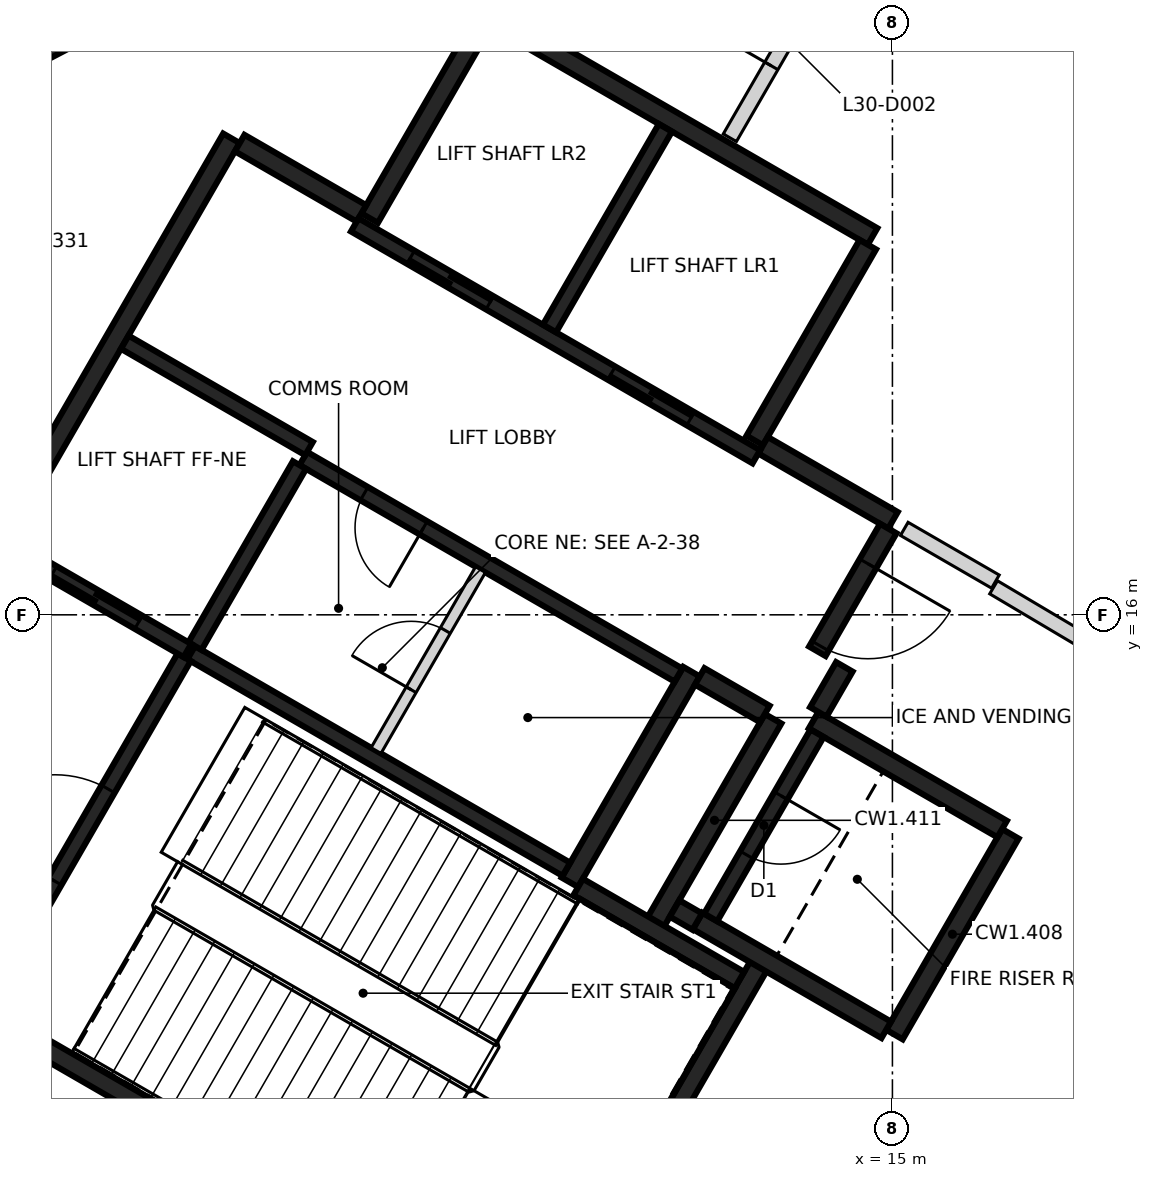
"""IFC4 building model, lengths in metres.
Left out: names, types, materials, properties, quantities, classifications, styles, units other than length and angle.
Written with IfcOpenShell. Run it as: python <this file> out.ifc"""

import sys

from ifc_helpers import new_model, si_unit, direction, frame, frame_2d, origin, origin_2d, place, context, subcontext, project, spatial, rectangle, extrude, element, fill, save


model = new_model("IFC4")
c1 = context("Model", 3, precision=1e-05, world=origin(), true_north=direction((0.0, 1.0)))
c2 = subcontext(c1, "Body", "Model", "MODEL_VIEW")
j1 = project(units=[si_unit("LENGTHUNIT", "METRE"), si_unit("PLANEANGLEUNIT", "RADIAN")], contexts=[c1])
p1 = place(None, origin())
s1 = spatial("IfcSite", under=j1, at=p1, CompositionType="ELEMENT")
p2 = place(p1, origin())
s2 = spatial("IfcBuilding", under=s1, at=p2, CompositionType="ELEMENT")
p3 = place(p2, frame((0.0, 0.0, 123.8)))
s3 = spatial("IfcBuildingStorey", under=s2, at=p3, CompositionType="ELEMENT", Elevation=123.8)
p4 = place(p3, frame((3.667, 23.896, -0.4), z_axis=(0.0, 0.0, 1.0), x_axis=(-0.463006774365, 0.886354740999, 0.0)))
e1 = element("IfcColumn", 1, at=p4, inside=s3, PredefinedType="COLUMN", context=c2, shape_type="SweptSolid", body=[
    extrude(rectangle(XDim=1.25, YDim=0.85, at=origin_2d()), origin(), (0.0, 0.0, 1.0), 5.0),
])
p5 = place(p3, frame((10.42, 6.498, 0.0), z_axis=(0.0, 0.0, 1.0), x_axis=(-0.866021906294, 0.500006057782, 0.0)))
e2 = element("IfcWall", 2, at=p5, inside=s3, PredefinedType="SHEAR", context=c2, shape_type="SweptSolid", body=[
    extrude(rectangle(XDim=11.55, YDim=0.25, at=frame_2d((5.775, 0.0))), origin(), (0.0, 0.0, 1.0), 4.6),
])
p6 = place(p5, frame((10.025, 0.0, 0.0)))
e3 = element("IfcOpeningElement", 3, at=p6, cuts=e2, PredefinedType="OPENING", context=c2, shape_type="SweptSolid", body=[
    extrude(rectangle(XDim=1.2, YDim=2.1, at=frame_2d((0.6, 1.05))), frame((0.0, 0.135, 0.0), z_axis=(0.0, -1.0, 0.0), x_axis=(1.0, 0.0, 0.0)), (0.0, 0.0, 1.0), 0.27),
])
p7 = place(p5, frame((8.725, 0.0, 0.0)))
e4 = element("IfcOpeningElement", 4, at=p7, cuts=e2, PredefinedType="OPENING", context=c2, shape_type="SweptSolid", body=[
    extrude(rectangle(XDim=1.2, YDim=2.1, at=frame_2d((0.6, 1.05))), frame((0.0, 0.135, 0.0), z_axis=(0.0, -1.0, 0.0), x_axis=(1.0, 0.0, 0.0)), (0.0, 0.0, 1.0), 0.27),
])
p8 = place(p3, frame((3.179, 16.856, 0.0), z_axis=(0.0, 0.0, 1.0), x_axis=(0.500004234368, 0.866022959057, 0.0)))
e5 = element("IfcWall", 5, at=p8, inside=s3, PredefinedType="SHEAR", context=c2, shape_type="SweptSolid", body=[
    extrude(rectangle(XDim=6.25, YDim=0.25, at=frame_2d((3.125, 0.0))), origin(), (0.0, 0.0, 1.0), 4.6),
])
p9 = place(p3, frame((9.673, 23.903, 0.0), z_axis=(0.0, 0.0, 1.0), x_axis=(0.86603616409, -0.499981362141, 0.0)))
e6 = element("IfcWall", 6, at=p9, inside=s3, PredefinedType="SHEAR", context=c2, shape_type="SweptSolid", body=[
    extrude(rectangle(XDim=5.85, YDim=0.25, at=frame_2d((2.925, 0.0))), origin(), (0.0, 0.0, 1.0), 4.6),
])
p10 = place(p3, frame((13.238, 11.378, 0.0), z_axis=(0.0, 0.0, 1.0), x_axis=(-0.500008851346, -0.866020293397, 0.0)))
e7 = element("IfcWall", 7, at=p10, inside=s3, PredefinedType="SHEAR", context=c2, shape_type="SweptSolid", body=[
    extrude(rectangle(XDim=5.51, YDim=0.25, at=frame_2d((2.755, 0.0))), origin(), (0.0, 0.0, 1.0), 4.6),
])
p11 = place(p3, frame((12.357, 15.252, 0.0), z_axis=(0.0, 0.0, 1.0), x_axis=(-0.500028443584, -0.866008981251, 0.0)))
e8 = element("IfcWall", 8, at=p11, inside=s3, PredefinedType="SHEAR", context=c2, shape_type="SweptSolid", body=[
    extrude(rectangle(XDim=3.2, YDim=0.25, at=frame_2d((1.6, 0.0))), origin(), (0.0, 0.0, 1.0), 4.6),
])
for number, where, z_axis, x_axis in (
    (9, (8.123, 21.219, 0.0), (0.0, 0.0, 1.0), (0.5, 0.866, 0.0)),
    (10, (14.676, 20.87, 0.0), (0.0, 0.0, 1.0), (-0.5, -0.866, 0.0)),
):
    element("IfcWall", number, at=place(p3, frame(where, z_axis=z_axis, x_axis=x_axis)), inside=s3, PredefinedType="SHEAR", context=c2, shape_type="SweptSolid", body=[
        extrude(rectangle(XDim=2.975, YDim=0.25, at=frame_2d((1.487, 0.0))), origin(), (0.0, 0.0, 1.0), 4.6),
    ])
p12 = place(p3, frame((16.552, 13.119, 0.0), z_axis=(0.0, 0.0, 1.0), x_axis=(-0.499978833458, -0.866037623948, 0.0)))
e11 = element("IfcWall", 11, at=p12, inside=s3, PredefinedType="SHEAR", context=c2, shape_type="SweptSolid", body=[
    extrude(rectangle(XDim=3.05, YDim=0.25, at=frame_2d((1.525, 0.0))), origin(), (0.0, 0.0, 1.0), 4.6),
])
p13 = place(p3, frame((14.918, 10.54, 0.0), z_axis=(0.0, 0.0, 1.0), x_axis=(-0.866063538972, 0.499933942099, 0.0)))
e12 = element("IfcWall", 12, at=p13, inside=s3, PredefinedType="SHEAR", context=c2, shape_type="SweptSolid", body=[
    extrude(rectangle(XDim=2.865, YDim=0.25, at=frame_2d((1.432, 0.0))), origin(), (0.0, 0.0, 1.0), 4.6),
])
p14 = place(p3, frame((13.963, 14.614, 0.0), z_axis=(0.0, 0.0, 1.0), x_axis=(0.866042235819, -0.499970844928, 0.0)))
e13 = element("IfcWall", 13, at=p14, inside=s3, PredefinedType="SHEAR", context=c2, shape_type="SweptSolid", body=[
    extrude(rectangle(XDim=2.865, YDim=0.25, at=frame_2d((1.432, 0.0))), origin(), (0.0, 0.0, 1.0), 4.6),
])
p15 = place(p3, frame((11.888, 11.961, 0.0), z_axis=(0.0, 0.0, 1.0), x_axis=(0.500003324108, 0.866023484601, 0.0)))
e14 = element("IfcWall", 14, at=p15, inside=s3, PredefinedType="SHEAR", context=c2, shape_type="SweptSolid", body=[
    extrude(rectangle(XDim=3.085, YDim=0.25, at=frame_2d((1.542, 0.0))), origin(), (0.0, 0.0, 1.0), 4.6),
])
p16 = place(p3, frame((10.865, 12.418, 0.0), z_axis=(0.0, 0.0, 1.0), x_axis=(0.866026229868, -0.499998569178, 0.0)))
e15 = element("IfcWall", 15, at=p16, inside=s3, PredefinedType="SHEAR", context=c2, shape_type="SweptSolid", body=[
    extrude(rectangle(XDim=2.449, YDim=0.25, at=frame_2d((1.225, 0.0))), origin(), (0.0, 0.0, 1.0), 4.6),
])
p17 = place(p3, frame((13.297, 18.231, 0.0), z_axis=(0.0, 0.0, 1.0), x_axis=(0.866043531843, -0.499968599967, 0.0)))
e16 = element("IfcWall", 16, at=p17, inside=s3, PredefinedType="SHEAR", context=c2, shape_type="SweptSolid", body=[
    extrude(rectangle(XDim=1.975, YDim=0.25, at=frame_2d((0.987, 0.0))), origin(), (0.0, 0.0, 1.0), 4.6),
])
p18 = place(p3, frame((6.413, 22.206, 0.0), z_axis=(0.0, 0.0, 1.0), x_axis=(0.866016279763, -0.500015802937, 0.0)))
e17 = element("IfcWall", 17, at=p18, inside=s3, PredefinedType="SHEAR", context=c2, shape_type="SweptSolid", body=[
    extrude(rectangle(XDim=1.849, YDim=0.25, at=frame_2d((0.925, 0.0))), origin(), (0.0, 0.0, 1.0), 4.6),
])
p19 = place(p3, frame((14.945, 17.135, 0.0), z_axis=(0.0, 0.0, 1.0), x_axis=(-0.499983108224, -0.866035156036, 0.0)))
e18 = element("IfcWall", 18, at=p19, inside=s3, PredefinedType="SHEAR", context=c2, shape_type="SweptSolid", body=[
    extrude(rectangle(XDim=1.865, YDim=0.25, at=frame_2d((0.932, 0.0))), origin(), (0.0, 0.0, 1.0), 4.6),
])
p20 = place(p19, frame((0.535, 0.0, 0.0)))
e19 = element("IfcOpeningElement", 19, at=p20, cuts=e18, PredefinedType="OPENING", context=c2, shape_type="SweptSolid", body=[
    extrude(rectangle(XDim=1.25, YDim=2.1, at=frame_2d((0.625, 1.05))), frame((0.0, 0.135, 0.0), z_axis=(0.0, -1.0, 0.0), x_axis=(1.0, 0.0, 0.0)), (0.0, 0.0, 1.0), 0.27),
])
p21 = place(p3, frame((13.322, 14.695, 0.0), z_axis=(0.0, 0.0, 1.0), x_axis=(-0.866017078145, 0.500014420154, 0.0)))
e20 = element("IfcWall", 20, at=p21, inside=s3, PredefinedType="SHEAR", context=c2, shape_type="SweptSolid", body=[
    extrude(rectangle(XDim=0.989, YDim=0.25, at=frame_2d((0.495, 0.0))), origin(), (0.0, 0.0, 1.0), 4.6),
])
p22 = place(p3, frame((14.368, 15.315, 0.0), z_axis=(0.0, 0.0, 1.0), x_axis=(-0.499897359611, -0.866084655132, 0.0)))
e21 = element("IfcWall", 21, at=p22, inside=s3, PredefinedType="SHEAR", context=c2, shape_type="SweptSolid", body=[
    extrude(rectangle(XDim=0.685, YDim=0.25, at=frame_2d((0.342, 0.0))), origin(), (0.0, 0.0, 1.0), 4.6),
])
p23 = place(p3, frame((12.433, 11.964, 0.0), z_axis=(0.0, 0.0, 1.0), x_axis=(-0.866055875208, 0.499947218231, 0.0)))
e22 = element("IfcWall", 22, at=p23, inside=s3, PredefinedType="SHEAR", context=c2, shape_type="SweptSolid", body=[
    extrude(rectangle(XDim=0.345, YDim=0.25, at=frame_2d((0.172, 0.0))), origin(), (0.0, 0.0, 1.0), 4.6),
])
p24 = place(p3, frame((13.21, 18.08, 0.0), z_axis=(0.0, 0.0, 1.0), x_axis=(-0.866030299012, 0.499991521122, 0.0)))
e23 = element("IfcWall", 23, at=p24, inside=s3, PredefinedType="SHEAR", context=c2, shape_type="SweptSolid", body=[
    extrude(rectangle(XDim=6.1, YDim=0.2, at=frame_2d((3.05, 0.0))), origin(), (0.0, 0.0, 1.0), 4.6),
])
p25 = place(p24, frame((1.0, 0.0, 0.0)))
e24 = element("IfcOpeningElement", 24, at=p25, cuts=e23, PredefinedType="OPENING", context=c2, shape_type="SweptSolid", body=[
    extrude(rectangle(XDim=1.2, YDim=2.1, at=frame_2d((0.6, 1.05))), frame((0.0, 0.11, 0.0), z_axis=(0.0, -1.0, 0.0), x_axis=(1.0, 0.0, 0.0)), (0.0, 0.0, 1.0), 0.22),
])
p26 = place(p24, frame((4.05, 0.0, 0.0)))
e25 = element("IfcOpeningElement", 25, at=p26, cuts=e23, PredefinedType="OPENING", context=c2, shape_type="SweptSolid", body=[
    extrude(rectangle(XDim=1.2, YDim=2.1, at=frame_2d((0.6, 1.05))), frame((0.0, 0.11, 0.0), z_axis=(0.0, -1.0, 0.0), x_axis=(1.0, 0.0, 0.0)), (0.0, 0.0, 1.0), 0.22),
])
p27 = place(p3, frame((5.775, 15.502, 0.0), z_axis=(0.0, 0.0, 1.0), x_axis=(0.866020080793, -0.500009219579, 0.0)))
e26 = element("IfcWall", 26, at=p27, inside=s3, PredefinedType="SHEAR", context=c2, shape_type="SweptSolid", body=[
    extrude(rectangle(XDim=5.699, YDim=0.2, at=frame_2d((2.85, 0.0))), origin(), (0.0, 0.0, 1.0), 4.6),
])
p28 = place(p3, frame((12.185, 15.207, 0.0), z_axis=(0.0, 0.0, 1.0), x_axis=(-0.866020080793, 0.500009219579, 0.0)))
e27 = element("IfcWall", 27, at=p28, inside=s3, PredefinedType="SHEAR", context=c2, shape_type="SweptSolid", body=[
    extrude(rectangle(XDim=5.699, YDim=0.2, at=frame_2d((2.85, 0.0))), origin(), (0.0, 0.0, 1.0), 4.6),
])
p29 = place(p28, frame((3.874, 0.0, 0.0)))
e28 = element("IfcOpeningElement", 28, at=p29, cuts=e27, PredefinedType="OPENING", context=c2, shape_type="SweptSolid", body=[
    extrude(rectangle(XDim=0.9, YDim=2.1, at=frame_2d((0.45, 1.05))), frame((0.0, 0.11, 0.0), z_axis=(0.0, -1.0, 0.0), x_axis=(1.0, 0.0, 0.0)), (0.0, 0.0, 1.0), 0.22),
])
p30 = place(p3, frame((3.057, 10.895, 0.0), z_axis=(0.0, 0.0, 1.0), x_axis=(0.499989418164, 0.866031513124, 0.0)))
e29 = element("IfcWall", 29, at=p30, inside=s3, PredefinedType="SHEAR", context=c2, shape_type="SweptSolid", body=[
    extrude(rectangle(XDim=5.251, YDim=0.2, at=frame_2d((2.625, 0.0))), origin(), (0.0, 0.0, 1.0), 4.6),
])
p31 = place(p30, frame((1.849, 0.0, 0.0)))
e30 = element("IfcOpeningElement", 30, at=p31, cuts=e29, PredefinedType="OPENING", context=c2, shape_type="SweptSolid", body=[
    extrude(rectangle(XDim=1.4, YDim=2.1, at=frame_2d((0.7, 1.05))), frame((0.0, 0.11, 0.0), z_axis=(0.0, -1.0, 0.0), x_axis=(1.0, 0.0, 0.0)), (0.0, 0.0, 1.0), 0.22),
])
p32 = place(p3, frame((10.489, 19.767, 0.0), z_axis=(0.0, 0.0, 1.0), x_axis=(0.499946628782, 0.866056215479, 0.0)))
e31 = element("IfcWall", 31, at=p32, inside=s3, PredefinedType="SHEAR", context=c2, shape_type="SweptSolid", body=[
    extrude(rectangle(XDim=3.048, YDim=0.2, at=frame_2d((1.524, 0.0))), origin(), (0.0, 0.0, 1.0), 4.6),
])
p33 = place(p3, frame((14.008, 14.442, 0.0), z_axis=(0.0, 0.0, 1.0), x_axis=(-0.499986818241, -0.866033014143, 0.0)))
e32 = element("IfcWall", 32, at=p33, inside=s3, PredefinedType="SHEAR", context=c2, shape_type="SweptSolid", body=[
    extrude(rectangle(XDim=2.798, YDim=0.2, at=frame_2d((1.399, 0.0))), origin(), (0.0, 0.0, 1.0), 4.6),
])
p34 = place(p33, frame((0.949, 0.0, 0.0)))
e33 = element("IfcOpeningElement", 33, at=p34, cuts=e32, PredefinedType="OPENING", context=c2, shape_type="SweptSolid", body=[
    extrude(rectangle(XDim=0.9, YDim=2.1, at=frame_2d((0.45, 1.05))), frame((0.0, 0.11, 0.0), z_axis=(0.0, -1.0, 0.0), x_axis=(1.0, 0.0, 0.0)), (0.0, 0.0, 1.0), 0.22),
])
p35 = place(p3, frame((7.199, 17.97, 0.0), z_axis=(0.0, 0.0, 1.0), x_axis=(-0.499968400327, -0.866043647095, 0.0)))
e34 = element("IfcWall", 34, at=p35, inside=s3, PredefinedType="SHEAR", context=c2, shape_type="SweptSolid", body=[
    extrude(rectangle(XDim=2.75, YDim=0.2, at=frame_2d((1.375, 0.0))), origin(), (0.0, 0.0, 1.0), 4.6),
])
p36 = place(p3, frame((5.725, 15.531, 0.0), z_axis=(0.0, 0.0, 1.0), x_axis=(-0.866037306777, 0.499979382845, 0.0)))
e35 = element("IfcWall", 35, at=p36, inside=s3, PredefinedType="SHEAR", context=c2, shape_type="SweptSolid", body=[
    extrude(rectangle(XDim=2.742, YDim=0.2, at=frame_2d((1.371, 0.0))), origin(), (0.0, 0.0, 1.0), 4.6),
])
p37 = place(p36, frame((0.743, 0.0, 0.0)))
e36 = element("IfcOpeningElement", 36, at=p37, cuts=e35, PredefinedType="OPENING", context=c2, shape_type="SweptSolid", body=[
    extrude(rectangle(XDim=1.3, YDim=2.1, at=frame_2d((0.65, 1.05))), frame((0.0, 0.11, 0.0), z_axis=(0.0, -1.0, 0.0), x_axis=(1.0, 0.0, 0.0)), (0.0, 0.0, 1.0), 0.22),
])
p38 = place(p3, frame((4.901, 19.586, 0.0), z_axis=(0.0, 0.0, 1.0), x_axis=(0.866022890907, -0.500004352405, 0.0)))
e37 = element("IfcWall", 37, at=p38, inside=s3, PredefinedType="SHEAR", context=c2, shape_type="SweptSolid", body=[
    extrude(rectangle(XDim=2.799, YDim=0.2, at=frame_2d((1.399, 0.0))), origin(), (0.0, 0.0, 1.0), 4.6),
])
p39 = place(p3, frame((8.207, 14.214, 0.0), z_axis=(0.0, 0.0, 1.0), x_axis=(0.499922376475, 0.866070215109, 0.0)))
e38 = element("IfcWall", 38, at=p39, inside=s3, PredefinedType="PARTITIONING", context=c2, shape_type="SweptSolid", body=[
    extrude(rectangle(XDim=2.749, YDim=0.15, at=frame_2d((1.374, 0.0))), origin(), (0.0, 0.0, 1.0), 4.6),
])
p40 = place(p39, frame((0.924, 0.0, 0.0)))
e39 = element("IfcOpeningElement", 39, at=p40, cuts=e38, PredefinedType="OPENING", context=c2, shape_type="SweptSolid", body=[
    extrude(rectangle(XDim=0.9, YDim=2.1, at=frame_2d((0.45, 1.05))), frame((0.0, 0.085, 0.0), z_axis=(0.0, -1.0, 0.0), x_axis=(1.0, 0.0, 0.0)), (0.0, 0.0, 1.0), 0.17),
])
p41 = place(p3, frame((15.156, 17.131, 0.0), z_axis=(0.0, 0.0, 1.0), x_axis=(0.865639364436, -0.500668044455, 0.0)))
e40 = element("IfcWall", 40, at=p41, inside=s3, PredefinedType="PARTITIONING", context=c2, shape_type="SweptSolid", body=[
    extrude(rectangle(XDim=1.385, YDim=0.2, at=frame_2d((0.693, 0.0))), origin(), (0.0, 0.0, 1.0), 4.6),
])
p42 = place(p3, frame((16.331, 16.362, 0.0), z_axis=(0.0, 0.0, 1.0), x_axis=(0.859936072859, -0.510401754107, 0.0)))
e41 = element("IfcWall", 41, at=p42, inside=s3, PredefinedType="PARTITIONING", context=c2, shape_type="SweptSolid", body=[
    extrude(rectangle(XDim=2.512, YDim=0.2, at=frame_2d((1.256, 0.0))), origin(), (0.0, 0.0, 1.0), 4.6),
])
p43 = place(p3, frame((16.956, 8.54, 0.0), z_axis=(0.0, 0.0, 1.0), x_axis=(0.506799683615, 0.862063849542, 0.0)))
e42 = element("IfcWall", 42, at=p43, inside=s3, PredefinedType="PARTITIONING", context=c2, shape_type="SweptSolid", body=[
    extrude(rectangle(XDim=4.453, YDim=0.2, at=frame_2d((2.227, 0.0))), origin(), (0.0, 0.0, 1.0), 3.7),
])
p44 = place(p3, frame((2.492, 16.236, 0.0), z_axis=(0.0, 0.0, 1.0), x_axis=(0.151721108942, 0.988423343058, 0.0)))
e43 = element("IfcWall", 43, at=p44, inside=s3, PredefinedType="PARTITIONING", context=c2, shape_type="SweptSolid", body=[
    extrude(rectangle(XDim=9.444, YDim=0.2, at=frame_2d((4.722, 0.0))), origin(), (0.0, 0.0, 1.0), 4.6),
])
p45 = place(p3, frame((12.861, 22.276, 0.0), z_axis=(0.0, 0.0, 1.0), x_axis=(0.500132837022, 0.865948696709, 0.0)))
e44 = element("IfcWall", 44, at=p45, inside=s3, PredefinedType="PARTITIONING", context=c2, shape_type="SweptSolid", body=[
    extrude(rectangle(XDim=7.587, YDim=0.2, at=frame_2d((3.793, 0.0))), origin(), (0.0, 0.0, 1.0), 4.6),
])
p46 = place(p45, frame((1.092, 0.0, 0.0)))
e45 = element("IfcOpeningElement", 45, at=p46, cuts=e44, PredefinedType="OPENING", context=c2, shape_type="SweptSolid", body=[
    extrude(rectangle(XDim=0.8, YDim=2.1, at=frame_2d((0.4, 1.05))), frame((0.0, 0.11, 0.0), z_axis=(0.0, -1.0, 0.0), x_axis=(1.0, 0.0, 0.0)), (0.0, 0.0, 1.0), 0.22),
])
p47 = place(p37, origin())
e46 = element("IfcDoor", 46, at=p47, inside=s3, OperationType="SLIDING_TO_RIGHT", PredefinedType="DOOR", context=c2, shape_type="SweptSolid", body=[
    extrude(rectangle(XDim=1.3, YDim=2.1, at=frame_2d((0.65, 1.05))), frame((0.0, 0.025, 0.0), z_axis=(0.0, -1.0, 0.0), x_axis=(1.0, 0.0, 0.0)), (0.0, 0.0, 1.0), 0.05),
])
fill(e36, e46)
p48 = place(p25, origin())
e47 = element("IfcDoor", 47, at=p48, inside=s3, OperationType="DOUBLE_DOOR_SLIDING", PredefinedType="DOOR", context=c2, shape_type="SweptSolid", body=[
    extrude(rectangle(XDim=1.2, YDim=2.1, at=frame_2d((0.6, 1.05))), frame((0.0, 0.025, 0.0), z_axis=(0.0, -1.0, 0.0), x_axis=(1.0, 0.0, 0.0)), (0.0, 0.0, 1.0), 0.05),
])
fill(e24, e47)
p49 = place(p26, origin())
e48 = element("IfcDoor", 48, at=p49, inside=s3, OperationType="DOUBLE_DOOR_SLIDING", PredefinedType="DOOR", context=c2, shape_type="SweptSolid", body=[
    extrude(rectangle(XDim=1.2, YDim=2.1, at=frame_2d((0.6, 1.05))), frame((0.0, 0.025, 0.0), z_axis=(0.0, -1.0, 0.0), x_axis=(1.0, 0.0, 0.0)), (0.0, 0.0, 1.0), 0.05),
])
fill(e25, e48)
p50 = place(p20, origin())
e49 = element("IfcDoor", 49, at=p50, inside=s3, OperationType="SINGLE_SWING_LEFT", PredefinedType="DOOR", context=c2, shape_type="SweptSolid", body=[
    extrude(rectangle(XDim=1.25, YDim=2.1, at=frame_2d((0.625, 1.05))), frame((0.0, 0.025, 0.0), z_axis=(0.0, -1.0, 0.0), x_axis=(1.0, 0.0, 0.0)), (0.0, 0.0, 1.0), 0.05),
])
fill(e19, e49)
p51 = place(p31, origin())
e50 = element("IfcDoor", 50, at=p51, inside=s3, OperationType="SINGLE_SWING_RIGHT", PredefinedType="DOOR", context=c2, shape_type="SweptSolid", body=[
    extrude(rectangle(XDim=1.4, YDim=2.1, at=frame_2d((0.7, 1.05))), frame((0.0, 0.025, 0.0), z_axis=(0.0, -1.0, 0.0), x_axis=(1.0, 0.0, 0.0)), (0.0, 0.0, 1.0), 0.05),
])
fill(e30, e50)
p52 = place(p29, origin())
e51 = element("IfcDoor", 51, at=p52, inside=s3, OperationType="SINGLE_SWING_LEFT", PredefinedType="DOOR", context=c2, shape_type="SweptSolid", body=[
    extrude(rectangle(XDim=0.9, YDim=2.1, at=frame_2d((0.45, 1.05))), frame((0.0, 0.025, 0.0), z_axis=(0.0, -1.0, 0.0), x_axis=(1.0, 0.0, 0.0)), (0.0, 0.0, 1.0), 0.05),
])
fill(e28, e51)
p53 = place(p34, origin())
e52 = element("IfcDoor", 52, at=p53, inside=s3, OperationType="SINGLE_SWING_RIGHT", PredefinedType="DOOR", context=c2, shape_type="SweptSolid", body=[
    extrude(rectangle(XDim=0.9, YDim=2.1, at=frame_2d((0.45, 1.05))), frame((0.0, 0.025, 0.0), z_axis=(0.0, -1.0, 0.0), x_axis=(1.0, 0.0, 0.0)), (0.0, 0.0, 1.0), 0.05),
])
fill(e33, e52)
p54 = place(p40, origin())
e53 = element("IfcDoor", 53, at=p54, inside=s3, OperationType="SINGLE_SWING_LEFT", PredefinedType="DOOR", context=c2, shape_type="SweptSolid", body=[
    extrude(rectangle(XDim=0.9, YDim=2.1, at=frame_2d((0.45, 1.05))), frame((0.0, 0.025, 0.0), z_axis=(0.0, -1.0, 0.0), x_axis=(1.0, 0.0, 0.0)), (0.0, 0.0, 1.0), 0.05),
])
fill(e39, e53)
p55 = place(p46, origin())
e54 = element("IfcDoor", 54, at=p55, inside=s3, OperationType="SINGLE_SWING_LEFT", PredefinedType="DOOR", context=c2, shape_type="SweptSolid", body=[
    extrude(rectangle(XDim=0.8, YDim=2.1, at=frame_2d((0.4, 1.05))), frame((0.0, 0.025, 0.0), z_axis=(0.0, -1.0, 0.0), x_axis=(1.0, 0.0, 0.0)), (0.0, 0.0, 1.0), 0.05),
])
fill(e45, e54)
save(model, sys.argv[1])
